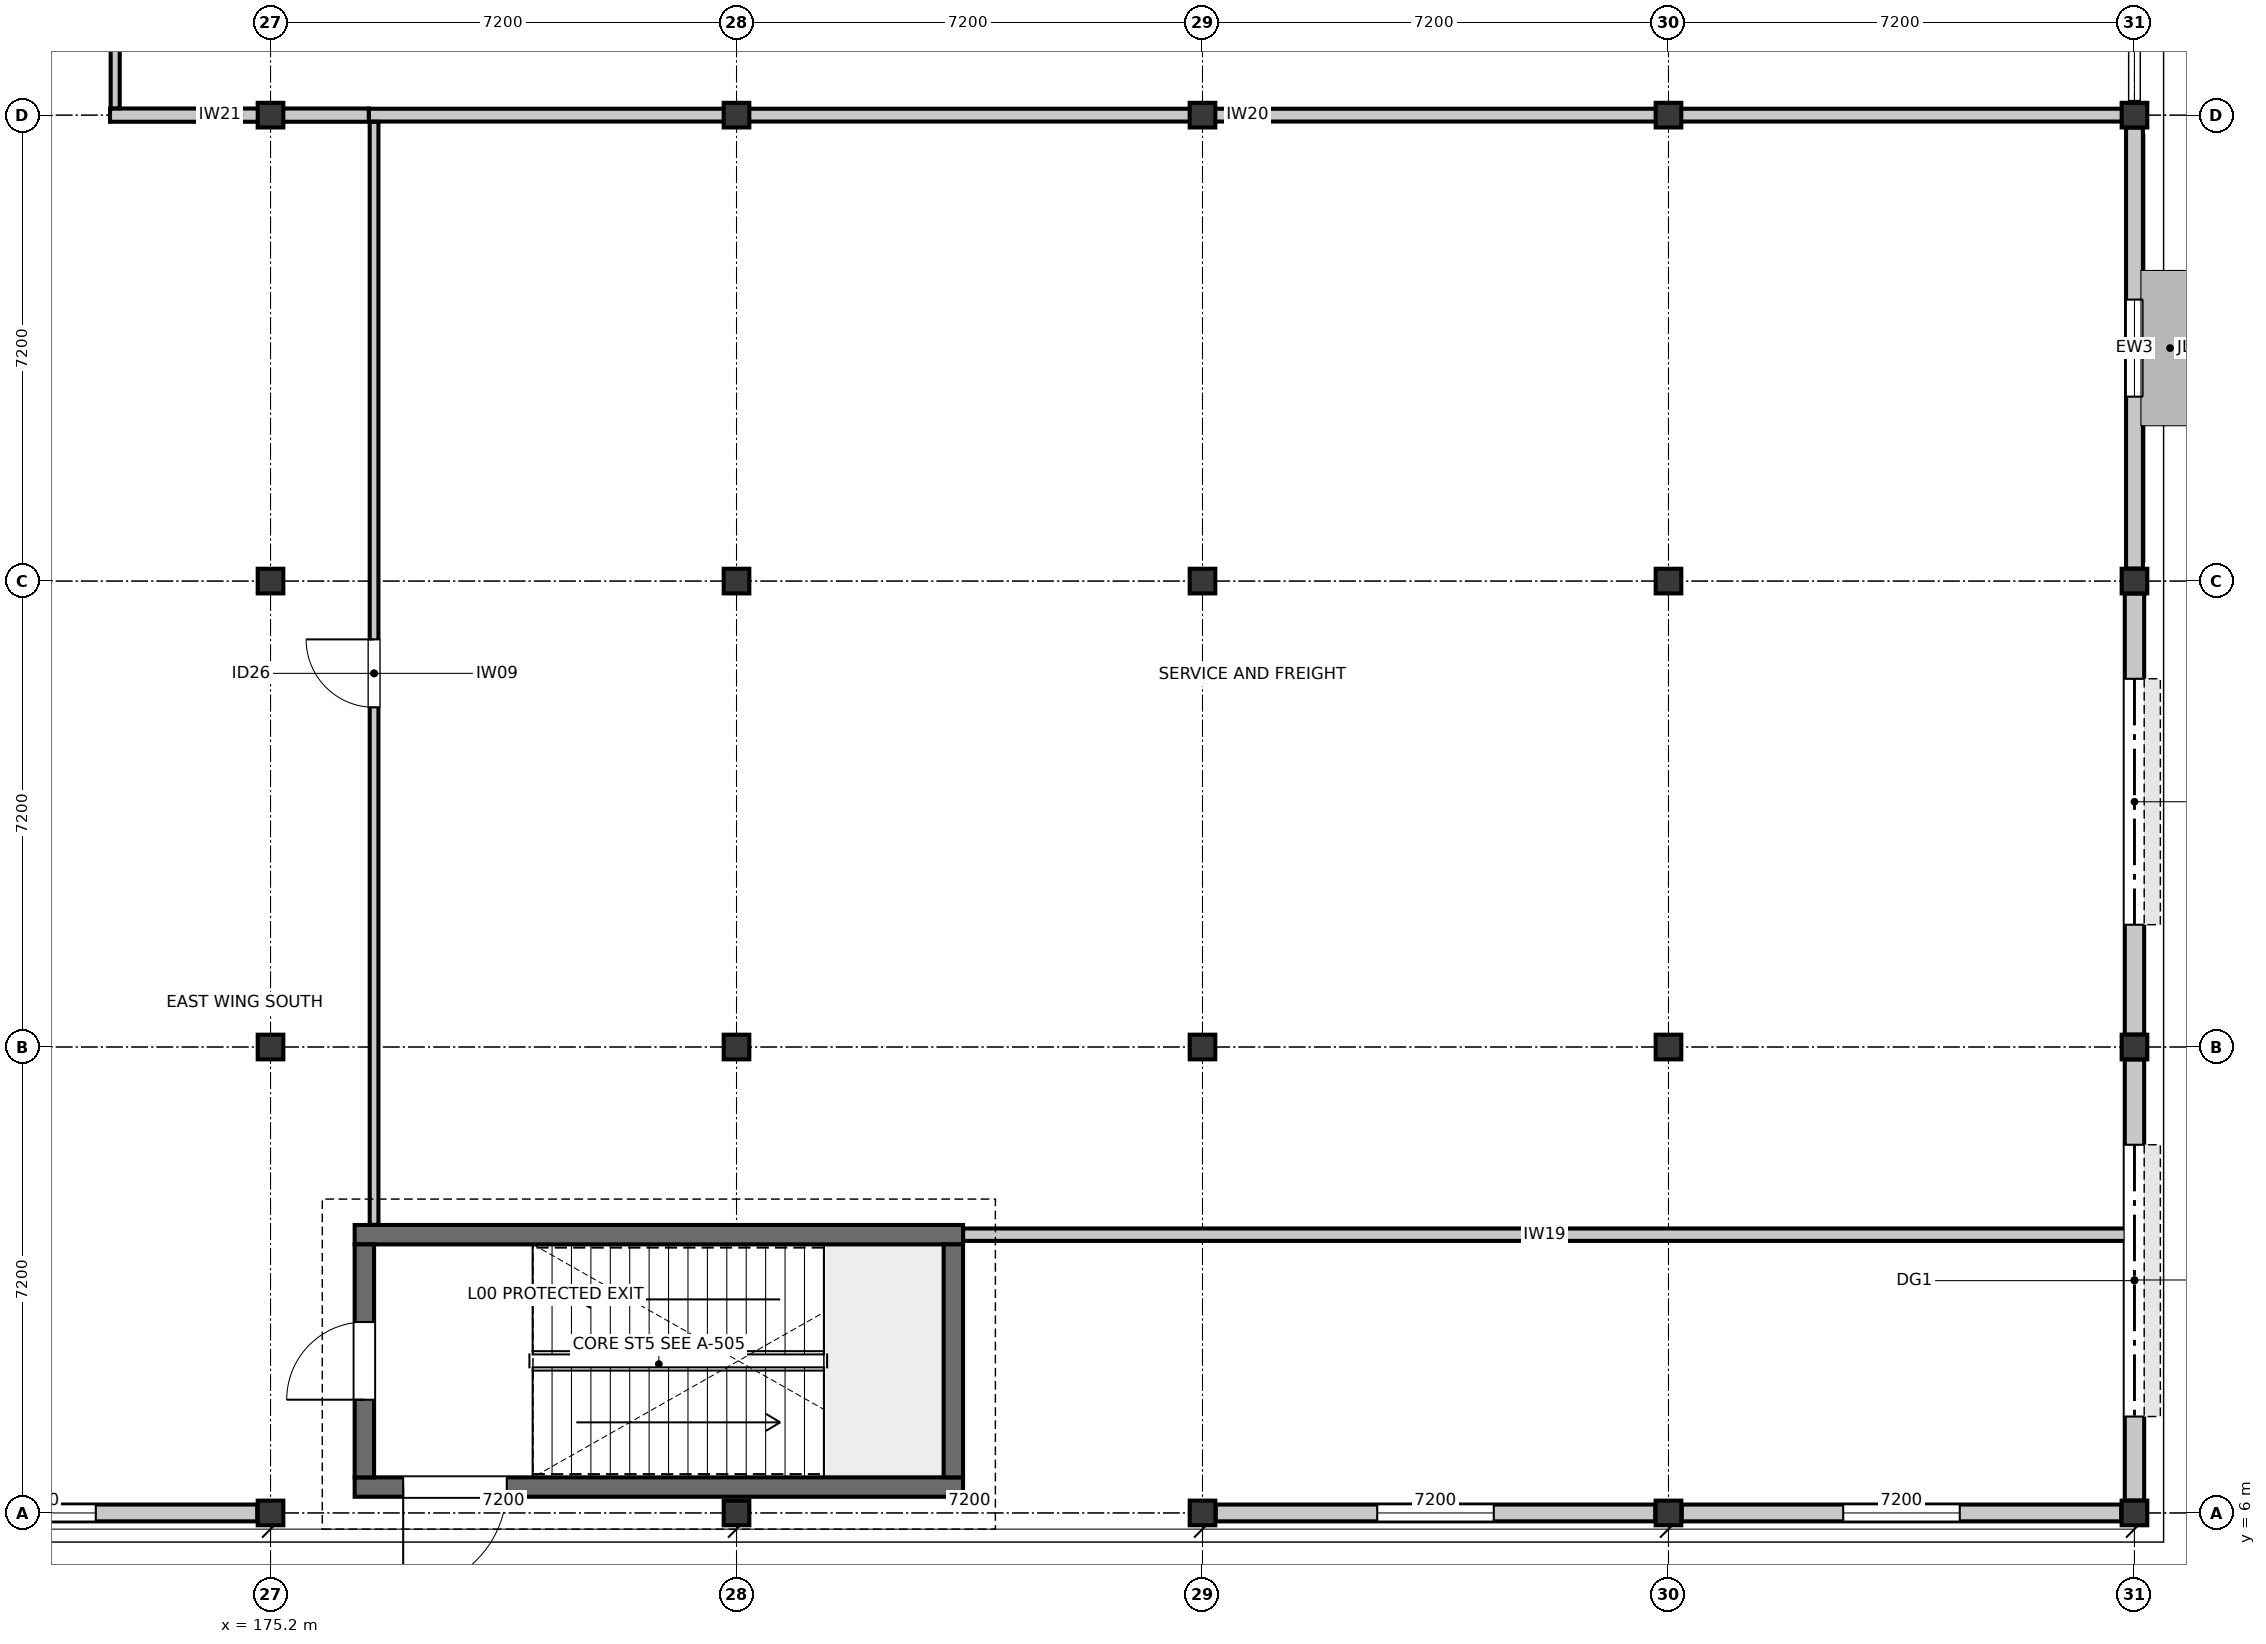
"""IFC4 building model, lengths in metres.
Left out: names, types, materials, properties, quantities, classifications, styles, units other than length and angle.
Written with IfcOpenShell. Run it as: python <this file> out.ifc"""

import sys

from ifc_helpers import new_model, si_unit, direction, frame, frame_2d, origin, origin_2d, place, context, subcontext, project, spatial, rectangle, i_section, extrude, element, fill, save


model = new_model("IFC4")
c1 = context("Model", 3, precision=1e-05, world=origin(), true_north=direction((0.0, 1.0)))
c2 = subcontext(c1, "Body", "Model", "MODEL_VIEW")
j1 = project(units=[si_unit("LENGTHUNIT", "METRE"), si_unit("PLANEANGLEUNIT", "RADIAN")], contexts=[c1])
p1 = place(None, origin())
s1 = spatial("IfcSite", under=j1, at=p1, CompositionType="ELEMENT")
p2 = place(p1, origin())
s2 = spatial("IfcBuilding", under=s1, at=p2, CompositionType="ELEMENT")
p3 = place(p2, origin())
s3 = spatial("IfcBuildingStorey", under=s2, at=p3, CompositionType="ELEMENT", Elevation=0.0)
for number, where, z_axis, x_axis in (
    (1, (175.2, 6.0, 0.0), (0.0, 0.0, 1.0), (1.0, 0.0, 0.0)),
    (2, (175.2, 13.2, 0.0), (0.0, 0.0, 1.0), (1.0, 0.0, 0.0)),
    (3, (175.2, 20.4, 0.0), (0.0, 0.0, 1.0), (1.0, 0.0, 0.0)),
    (4, (175.2, 27.6, 0.0), (0.0, 0.0, 1.0), (1.0, 0.0, 0.0)),
    (5, (182.4, 6.0, 0.0), (0.0, 0.0, 1.0), (1.0, 0.0, 0.0)),
    (6, (182.4, 13.2, 0.0), (0.0, 0.0, 1.0), (1.0, 0.0, 0.0)),
    (7, (182.4, 20.4, 0.0), (0.0, 0.0, 1.0), (1.0, 0.0, 0.0)),
    (8, (182.4, 27.6, 0.0), (0.0, 0.0, 1.0), (1.0, 0.0, 0.0)),
    (9, (189.6, 6.0, 0.0), (0.0, 0.0, 1.0), (1.0, 0.0, 0.0)),
    (10, (189.6, 13.2, 0.0), (0.0, 0.0, 1.0), (1.0, 0.0, 0.0)),
    (11, (189.6, 20.4, 0.0), (0.0, 0.0, 1.0), (1.0, 0.0, 0.0)),
    (12, (189.6, 27.6, 0.0), (0.0, 0.0, 1.0), (1.0, 0.0, 0.0)),
    (13, (196.8, 6.0, 0.0), (0.0, 0.0, 1.0), (1.0, 0.0, 0.0)),
    (14, (196.8, 13.2, 0.0), (0.0, 0.0, 1.0), (1.0, 0.0, 0.0)),
    (15, (196.8, 20.4, 0.0), (0.0, 0.0, 1.0), (1.0, 0.0, 0.0)),
    (16, (196.8, 27.6, 0.0), (0.0, 0.0, 1.0), (1.0, 0.0, 0.0)),
    (17, (204.0, 6.0, 0.0), (0.0, 0.0, 1.0), (1.0, 0.0, 0.0)),
    (18, (204.0, 13.2, 0.0), (0.0, 0.0, 1.0), (1.0, 0.0, 0.0)),
    (19, (204.0, 20.4, 0.0), (0.0, 0.0, 1.0), (1.0, 0.0, 0.0)),
    (20, (204.0, 27.6, 0.0), (0.0, 0.0, 1.0), (1.0, 0.0, 0.0)),
):
    element("IfcColumn", number, at=place(p3, frame(where, z_axis=z_axis, x_axis=x_axis)), inside=s3, PredefinedType="COLUMN", context=c2, shape_type="SweptSolid", body=[
        extrude(i_section(OverallWidth=0.396, OverallDepth=0.381, WebThickness=0.019, FlangeThickness=0.03, FilletRadius=0.015, at=origin_2d()), origin(), (0.0, 0.0, 1.0), 5.4),
    ])
p4 = place(p3, frame((204.0, 13.008, 0.0), z_axis=(0.0, 0.0, 1.0), x_axis=(0.0, -1.0, 0.0)))
e21 = element("IfcWall", 21, at=p4, inside=s3, PredefinedType="STANDARD", context=c2, shape_type="SweptSolid", body=[
    extrude(rectangle(XDim=6.816, YDim=0.3, at=frame_2d((3.408, 0.0))), origin(), (0.0, 0.0, 1.0), 4.442),
])
p5 = place(p4, frame((1.318, 0.0, 0.0)))
e22 = element("IfcOpeningElement", 22, at=p5, cuts=e21, PredefinedType="OPENING", context=c2, shape_type="SweptSolid", body=[
    extrude(rectangle(XDim=4.2, YDim=4.1, at=frame_2d((2.1, 2.05))), frame((0.0, 0.16, 0.0), z_axis=(0.0, -1.0, 0.0), x_axis=(1.0, 0.0, 0.0)), (0.0, 0.0, 1.0), 0.32),
])
p6 = place(p3, frame((204.0, 20.208, 0.0), z_axis=(0.0, 0.0, 1.0), x_axis=(0.0, -1.0, 0.0)))
e23 = element("IfcWall", 23, at=p6, inside=s3, PredefinedType="STANDARD", context=c2, shape_type="SweptSolid", body=[
    extrude(rectangle(XDim=6.816, YDim=0.3, at=frame_2d((3.408, 0.0))), origin(), (0.0, 0.0, 1.0), 4.442),
])
p7 = place(p6, frame((1.318, 0.0, 0.0)))
e24 = element("IfcOpeningElement", 24, at=p7, cuts=e23, PredefinedType="OPENING", context=c2, shape_type="SweptSolid", body=[
    extrude(rectangle(XDim=3.8, YDim=4.0, at=frame_2d((1.9, 2.0))), frame((0.0, 0.16, 0.0), z_axis=(0.0, -1.0, 0.0), x_axis=(1.0, 0.0, 0.0)), (0.0, 0.0, 1.0), 0.32),
])
p8 = place(p3, frame((204.0, 27.408, 0.0), z_axis=(0.0, 0.0, 1.0), x_axis=(0.0, -1.0, 0.0)))
e25 = element("IfcWall", 25, at=p8, inside=s3, PredefinedType="STANDARD", context=c2, shape_type="SweptSolid", body=[
    extrude(rectangle(XDim=6.816, YDim=0.26, at=frame_2d((3.408, 0.0))), origin(), (0.0, 0.0, 1.0), 4.442),
])
p9 = place(p8, frame((2.658, 0.0, 0.9)))
e26 = element("IfcOpeningElement", 26, at=p9, cuts=e25, PredefinedType="OPENING", context=c2, shape_type="SweptSolid", body=[
    extrude(rectangle(XDim=1.5, YDim=1.5, at=frame_2d((0.75, 0.75))), frame((0.0, 0.14, 0.0), z_axis=(0.0, -1.0, 0.0), x_axis=(1.0, 0.0, 0.0)), (0.0, 0.0, 1.0), 0.28),
])
p10 = place(p3, frame((174.995, 6.0, 0.0), z_axis=(0.0, 0.0, 1.0), x_axis=(-1.0, 0.0, 0.0)))
e27 = element("IfcWall", 27, at=p10, inside=s3, PredefinedType="STANDARD", context=c2, shape_type="SweptSolid", body=[
    extrude(rectangle(XDim=6.79, YDim=0.26, at=frame_2d((3.395, 0.0))), origin(), (0.0, 0.0, 1.0), 4.442),
])
p11 = place(p10, frame((2.495, 0.0, 0.9)))
e28 = element("IfcOpeningElement", 28, at=p11, cuts=e27, PredefinedType="OPENING", context=c2, shape_type="SweptSolid", body=[
    extrude(rectangle(XDim=1.8, YDim=1.5, at=frame_2d((0.9, 0.75))), frame((0.0, 0.14, 0.0), z_axis=(0.0, -1.0, 0.0), x_axis=(1.0, 0.0, 0.0)), (0.0, 0.0, 1.0), 0.28),
])
p12 = place(p3, frame((196.595, 6.0, 0.0), z_axis=(0.0, 0.0, 1.0), x_axis=(-1.0, 0.0, 0.0)))
e29 = element("IfcWall", 29, at=p12, inside=s3, PredefinedType="STANDARD", context=c2, shape_type="SweptSolid", body=[
    extrude(rectangle(XDim=6.79, YDim=0.26, at=frame_2d((3.395, 0.0))), origin(), (0.0, 0.0, 1.0), 4.442),
])
p13 = place(p12, frame((2.495, 0.0, 0.9)))
e30 = element("IfcOpeningElement", 30, at=p13, cuts=e29, PredefinedType="OPENING", context=c2, shape_type="SweptSolid", body=[
    extrude(rectangle(XDim=1.8, YDim=1.5, at=frame_2d((0.9, 0.75))), frame((0.0, 0.14, 0.0), z_axis=(0.0, -1.0, 0.0), x_axis=(1.0, 0.0, 0.0)), (0.0, 0.0, 1.0), 0.28),
])
p14 = place(p3, frame((203.795, 6.0, 0.0), z_axis=(0.0, 0.0, 1.0), x_axis=(-1.0, 0.0, 0.0)))
e31 = element("IfcWall", 31, at=p14, inside=s3, PredefinedType="STANDARD", context=c2, shape_type="SweptSolid", body=[
    extrude(rectangle(XDim=6.79, YDim=0.26, at=frame_2d((3.395, 0.0))), origin(), (0.0, 0.0, 1.0), 4.442),
])
p15 = place(p14, frame((2.495, 0.0, 0.9)))
e32 = element("IfcOpeningElement", 32, at=p15, cuts=e31, PredefinedType="OPENING", context=c2, shape_type="SweptSolid", body=[
    extrude(rectangle(XDim=1.8, YDim=1.5, at=frame_2d((0.9, 0.75))), frame((0.0, 0.14, 0.0), z_axis=(0.0, -1.0, 0.0), x_axis=(1.0, 0.0, 0.0)), (0.0, 0.0, 1.0), 0.28),
])
p16 = place(p3, frame((185.9, 6.4, 0.0), z_axis=(0.0, 0.0, 1.0), x_axis=(-1.0, 0.0, 0.0)))
e33 = element("IfcWall", 33, at=p16, inside=s3, PredefinedType="SOLIDWALL", context=c2, shape_type="SweptSolid", body=[
    extrude(rectangle(XDim=9.4, YDim=0.3, at=frame_2d((4.7, 0.0))), origin(), (0.0, 0.0, 1.0), 5.14),
])
p17 = place(p16, frame((7.05, 0.0, 0.0)))
e34 = element("IfcOpeningElement", 34, at=p17, cuts=e33, PredefinedType="OPENING", context=c2, shape_type="SweptSolid", body=[
    extrude(rectangle(XDim=1.6, YDim=2.15, at=frame_2d((0.8, 1.075))), frame((0.0, 0.16, 0.0), z_axis=(0.0, -1.0, 0.0), x_axis=(1.0, 0.0, 0.0)), (0.0, 0.0, 1.0), 0.32),
])
p18 = place(p3, frame((176.5, 10.3, 0.0), z_axis=(0.0, 0.0, 1.0), x_axis=(1.0, 0.0, 0.0)))
e35 = element("IfcWall", 35, at=p18, inside=s3, PredefinedType="SOLIDWALL", context=c2, shape_type="SweptSolid", body=[
    extrude(rectangle(XDim=9.4, YDim=0.3, at=frame_2d((4.7, 0.0))), origin(), (0.0, 0.0, 1.0), 5.14),
])
p19 = place(p3, frame((176.65, 6.55, 0.0), z_axis=(0.0, 0.0, 1.0), x_axis=(0.0, 1.0, 0.0)))
e36 = element("IfcWall", 36, at=p19, inside=s3, PredefinedType="SOLIDWALL", context=c2, shape_type="SweptSolid", body=[
    extrude(rectangle(XDim=3.6, YDim=0.3, at=frame_2d((1.8, 0.0))), origin(), (0.0, 0.0, 1.0), 5.14),
])
p20 = place(p19, frame((1.2, 0.0, 0.0)))
e37 = element("IfcOpeningElement", 37, at=p20, cuts=e36, PredefinedType="OPENING", context=c2, shape_type="SweptSolid", body=[
    extrude(rectangle(XDim=1.2, YDim=2.2, at=frame_2d((0.6, 1.1))), frame((0.0, 0.16, 0.0), z_axis=(0.0, -1.0, 0.0), x_axis=(1.0, 0.0, 0.0)), (0.0, 0.0, 1.0), 0.32),
])
p21 = place(p3, frame((185.75, 10.15, 0.0), z_axis=(0.0, 0.0, 1.0), x_axis=(0.0, -1.0, 0.0)))
e38 = element("IfcWall", 38, at=p21, inside=s3, PredefinedType="SOLIDWALL", context=c2, shape_type="SweptSolid", body=[
    extrude(rectangle(XDim=3.6, YDim=0.3, at=frame_2d((1.8, 0.0))), origin(), (0.0, 0.0, 1.0), 5.14),
])
p22 = place(p3, frame((203.868, 10.3, 0.0), z_axis=(0.0, 0.0, 1.0), x_axis=(-1.0, 0.0, 0.0)))
e39 = element("IfcWall", 39, at=p22, inside=s3, PredefinedType="PARTITIONING", context=c2, shape_type="SweptSolid", body=[
    extrude(rectangle(XDim=17.966, YDim=0.192, at=frame_2d((8.983, 0.0))), origin(), (0.0, 0.0, 1.0), 4.437),
])
p23 = place(p3, frame((176.72, 27.6, 0.0), z_axis=(0.0, 0.0, 1.0), x_axis=(1.0, 0.0, 0.0)))
e40 = element("IfcWall", 40, at=p23, inside=s3, PredefinedType="PARTITIONING", context=c2, shape_type="SweptSolid", body=[
    extrude(rectangle(XDim=27.148, YDim=0.198, at=frame_2d((13.574, 0.0))), origin(), (0.0, 0.0, 1.0), 4.437),
])
p24 = place(p3, frame((176.718, 27.6, 0.0), z_axis=(0.0, 0.0, 1.0), x_axis=(-1.0, 0.0, 0.0)))
e41 = element("IfcWall", 41, at=p24, inside=s3, PredefinedType="PARTITIONING", context=c2, shape_type="SweptSolid", body=[
    extrude(rectangle(XDim=3.998, YDim=0.205, at=frame_2d((1.999, 0.0))), origin(), (0.0, 0.0, 1.0), 4.437),
])
p25 = place(p3, frame((176.8, 10.452, 0.0), z_axis=(0.0, 0.0, 1.0), x_axis=(0.0, 1.0, 0.0)))
e42 = element("IfcWall", 42, at=p25, inside=s3, PredefinedType="PARTITIONING", context=c2, shape_type="SweptSolid", body=[
    extrude(rectangle(XDim=17.044, YDim=0.135, at=frame_2d((8.522, 0.0))), origin(), (0.0, 0.0, 1.0), 4.437),
])
p26 = place(p25, frame((7.997, 0.0, 0.0)))
e43 = element("IfcOpeningElement", 43, at=p26, cuts=e42, PredefinedType="OPENING", context=c2, shape_type="SweptSolid", body=[
    extrude(rectangle(XDim=1.05, YDim=2.22, at=frame_2d((0.525, 1.11))), frame((0.0, 0.077, 0.0), z_axis=(0.0, -1.0, 0.0), x_axis=(1.0, 0.0, 0.0)), (0.0, 0.0, 1.0), 0.155),
])
p27 = place(p3, frame((172.8, 27.705, 0.0), z_axis=(0.0, 0.0, 1.0), x_axis=(0.0, 1.0, 0.0)))
e44 = element("IfcWall", 44, at=p27, inside=s3, PredefinedType="PARTITIONING", context=c2, shape_type="SweptSolid", body=[
    extrude(rectangle(XDim=21.387, YDim=0.14, at=frame_2d((10.693, 0.0))), origin(), (0.0, 0.0, 1.0), 4.437),
])
p28 = place(p27, frame((10.134, 0.0, 0.0)))
e45 = element("IfcOpeningElement", 45, at=p28, cuts=e44, PredefinedType="OPENING", context=c2, shape_type="SweptSolid", body=[
    extrude(rectangle(XDim=1.12, YDim=2.22, at=frame_2d((0.56, 1.11))), frame((0.0, 0.08, 0.0), z_axis=(0.0, -1.0, 0.0), x_axis=(1.0, 0.0, 0.0)), (0.0, 0.0, 1.0), 0.16),
])
p29 = place(p5, origin())
e46 = element("IfcDoor", 46, at=p29, inside=s3, OperationType="ROLLINGUP", PredefinedType="GATE", context=c2, shape_type="SweptSolid", body=[
    extrude(rectangle(XDim=4.2, YDim=4.1, at=frame_2d((2.1, 2.05))), frame((0.0, 0.025, 0.0), z_axis=(0.0, -1.0, 0.0), x_axis=(1.0, 0.0, 0.0)), (0.0, 0.0, 1.0), 0.05),
])
fill(e22, e46)
p30 = place(p7, origin())
e47 = element("IfcDoor", 47, at=p30, inside=s3, OperationType="ROLLINGUP", PredefinedType="GATE", context=c2, shape_type="SweptSolid", body=[
    extrude(rectangle(XDim=3.8, YDim=4.0, at=frame_2d((1.9, 2.0))), frame((0.0, 0.025, 0.0), z_axis=(0.0, -1.0, 0.0), x_axis=(1.0, 0.0, 0.0)), (0.0, 0.0, 1.0), 0.05),
])
fill(e24, e47)
p31 = place(p9, origin())
e48 = element("IfcWindow", 48, at=p31, inside=s3, PartitioningType="SINGLE_PANEL", PredefinedType="WINDOW", context=c2, shape_type="SweptSolid", body=[
    extrude(rectangle(XDim=1.5, YDim=1.5, at=frame_2d((0.75, 0.75))), frame((0.0, 0.03, 0.0), z_axis=(0.0, -1.0, 0.0), x_axis=(1.0, 0.0, 0.0)), (0.0, 0.0, 1.0), 0.06),
])
fill(e26, e48)
p32 = place(p11, origin())
e49 = element("IfcWindow", 49, at=p32, inside=s3, PartitioningType="SINGLE_PANEL", PredefinedType="WINDOW", context=c2, shape_type="SweptSolid", body=[
    extrude(rectangle(XDim=1.8, YDim=1.5, at=frame_2d((0.9, 0.75))), frame((0.0, 0.03, 0.0), z_axis=(0.0, -1.0, 0.0), x_axis=(1.0, 0.0, 0.0)), (0.0, 0.0, 1.0), 0.06),
])
fill(e28, e49)
p33 = place(p13, origin())
e50 = element("IfcWindow", 50, at=p33, inside=s3, PartitioningType="SINGLE_PANEL", PredefinedType="WINDOW", context=c2, shape_type="SweptSolid", body=[
    extrude(rectangle(XDim=1.8, YDim=1.5, at=frame_2d((0.9, 0.75))), frame((0.0, 0.03, 0.0), z_axis=(0.0, -1.0, 0.0), x_axis=(1.0, 0.0, 0.0)), (0.0, 0.0, 1.0), 0.06),
])
fill(e30, e50)
p34 = place(p15, origin())
e51 = element("IfcWindow", 51, at=p34, inside=s3, PartitioningType="SINGLE_PANEL", PredefinedType="WINDOW", context=c2, shape_type="SweptSolid", body=[
    extrude(rectangle(XDim=1.8, YDim=1.5, at=frame_2d((0.9, 0.75))), frame((0.0, 0.03, 0.0), z_axis=(0.0, -1.0, 0.0), x_axis=(1.0, 0.0, 0.0)), (0.0, 0.0, 1.0), 0.06),
])
fill(e32, e51)
p35 = place(p17, origin())
e52 = element("IfcDoor", 52, at=p35, inside=s3, OperationType="SINGLE_SWING_RIGHT", PredefinedType="DOOR", context=c2, shape_type="SweptSolid", body=[
    extrude(rectangle(XDim=1.6, YDim=2.15, at=frame_2d((0.8, 1.075))), frame((0.0, 0.025, 0.0), z_axis=(0.0, -1.0, 0.0), x_axis=(1.0, 0.0, 0.0)), (0.0, 0.0, 1.0), 0.05),
])
fill(e34, e52)
p36 = place(p20, origin())
e53 = element("IfcDoor", 53, at=p36, inside=s3, OperationType="SINGLE_SWING_LEFT", PredefinedType="DOOR", context=c2, shape_type="SweptSolid", body=[
    extrude(rectangle(XDim=1.2, YDim=2.2, at=frame_2d((0.6, 1.1))), frame((0.0, 0.025, 0.0), z_axis=(0.0, -1.0, 0.0), x_axis=(1.0, 0.0, 0.0)), (0.0, 0.0, 1.0), 0.05),
])
fill(e37, e53)
p37 = place(p26, origin())
e54 = element("IfcDoor", 54, at=p37, inside=s3, OperationType="SINGLE_SWING_RIGHT", PredefinedType="DOOR", context=c2, shape_type="SweptSolid", body=[
    extrude(rectangle(XDim=1.05, YDim=2.22, at=frame_2d((0.525, 1.11))), frame((0.0, 0.025, 0.0), z_axis=(0.0, -1.0, 0.0), x_axis=(1.0, 0.0, 0.0)), (0.0, 0.0, 1.0), 0.05),
])
fill(e43, e54)
save(model, sys.argv[1])
